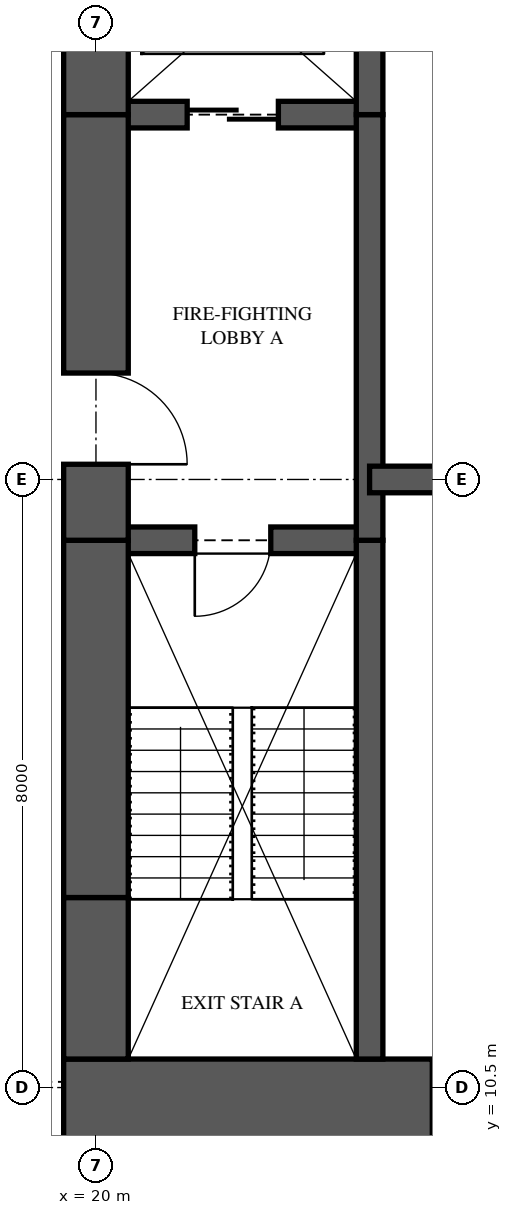
"""IFC4 building model, lengths in metres.
Left out: names, types, materials, properties, quantities, classifications, styles, units other than length and angle.
Written with IfcOpenShell. Run it as: python <this file> out.ifc"""

import sys

from ifc_helpers import new_model, si_unit, direction, frame, frame_2d, origin, place, context, subcontext, project, spatial, rectangle, extrude, element, fill, save


model = new_model("IFC4")
c1 = context("Model", 3, precision=1e-05, world=origin(), true_north=direction((0.0, 1.0)))
c2 = subcontext(c1, "Body", "Model", "MODEL_VIEW")
j1 = project(units=[si_unit("LENGTHUNIT", "METRE"), si_unit("PLANEANGLEUNIT", "RADIAN")], contexts=[c1])
p1 = place(None, origin())
s1 = spatial("IfcSite", under=j1, at=p1, CompositionType="ELEMENT")
p2 = place(p1, origin())
s2 = spatial("IfcBuilding", under=s1, at=p2, CompositionType="ELEMENT")
p3 = place(p2, frame((0.0, 0.0, 111.55)))
s3 = spatial("IfcBuildingStorey", under=s2, at=p3, CompositionType="ELEMENT", Elevation=111.55)
p4 = place(p3, frame((19.575, 10.125, 0.0), z_axis=(0.0, 0.0, 1.0), x_axis=(1.0, 0.0, 0.0)))
e1 = element("IfcWall", 1, at=p4, inside=s3, PredefinedType="SHEAR", context=c2, shape_type="SweptSolid", body=[
    extrude(rectangle(XDim=6.425, YDim=1.5, at=frame_2d((3.212, 0.0))), origin(), (0.0, 0.0, 1.0), 3.35),
])
p5 = place(p4, frame((4.85, 0.0, 0.0)))
e2 = element("IfcOpeningElement", 2, at=p5, cuts=e1, PredefinedType="OPENING", context=c2, shape_type="SweptSolid", body=[
    extrude(rectangle(XDim=0.75, YDim=2.1, at=frame_2d((0.375, 1.05))), frame((0.0, 0.76, 0.0), z_axis=(0.0, -1.0, 0.0), x_axis=(1.0, 0.0, 0.0)), (0.0, 0.0, 1.0), 1.52),
])
p6 = place(p3, frame((20.0, 26.125, 0.0), z_axis=(0.0, 0.0, 1.0), x_axis=(0.0, -1.0, 0.0)))
e3 = element("IfcWall", 3, at=p6, inside=s3, PredefinedType="SHEAR", context=c2, shape_type="SweptSolid", body=[
    extrude(rectangle(XDim=2.825, YDim=0.85, at=frame_2d((1.413, 0.0))), origin(), (0.0, 0.0, 1.0), 3.35),
])
p7 = place(p3, frame((20.0, 23.3, 0.0), z_axis=(0.0, 0.0, 1.0), x_axis=(0.0, -1.0, 0.0)))
e4 = element("IfcWall", 4, at=p7, inside=s3, PredefinedType="SHEAR", context=c2, shape_type="SweptSolid", body=[
    extrude(rectangle(XDim=5.6, YDim=0.85, at=frame_2d((2.8, 0.0))), origin(), (0.0, 0.0, 1.0), 3.35),
])
p8 = place(p7, frame((3.4, 0.0, 0.0)))
e5 = element("IfcOpeningElement", 5, at=p8, cuts=e4, PredefinedType="OPENING", context=c2, shape_type="SweptSolid", body=[
    extrude(rectangle(XDim=1.2, YDim=2.2, at=frame_2d((0.6, 1.1))), frame((0.0, 0.435, 0.0), z_axis=(0.0, -1.0, 0.0), x_axis=(1.0, 0.0, 0.0)), (0.0, 0.0, 1.0), 0.87),
])
p9 = place(p3, frame((20.0, 17.7, 0.0), z_axis=(0.0, 0.0, 1.0), x_axis=(0.0, -1.0, 0.0)))
e6 = element("IfcWall", 6, at=p9, inside=s3, PredefinedType="SHEAR", context=c2, shape_type="SweptSolid", body=[
    extrude(rectangle(XDim=4.7, YDim=0.85, at=frame_2d((2.35, 0.0))), origin(), (0.0, 0.0, 1.0), 3.35),
])
p10 = place(p3, frame((20.0, 13.0, 0.0), z_axis=(0.0, 0.0, 1.0), x_axis=(0.0, -1.0, 0.0)))
e7 = element("IfcWall", 7, at=p10, inside=s3, PredefinedType="SHEAR", context=c2, shape_type="SweptSolid", body=[
    extrude(rectangle(XDim=2.125, YDim=0.85, at=frame_2d((1.062, 0.0))), origin(), (0.0, 0.0, 1.0), 3.35),
])
p11 = place(p3, frame((23.6, 10.875, 0.0), z_axis=(0.0, 0.0, 1.0), x_axis=(0.0, 1.0, 0.0)))
e8 = element("IfcWall", 8, at=p11, inside=s3, PredefinedType="SHEAR", context=c2, shape_type="SweptSolid", body=[
    extrude(rectangle(XDim=6.825, YDim=0.35, at=frame_2d((3.413, 0.0))), origin(), (0.0, 0.0, 1.0), 3.35),
])
p12 = place(p3, frame((23.6, 17.7, 0.0), z_axis=(0.0, 0.0, 1.0), x_axis=(0.0, 1.0, 0.0)))
e9 = element("IfcWall", 9, at=p12, inside=s3, PredefinedType="SHEAR", context=c2, shape_type="SweptSolid", body=[
    extrude(rectangle(XDim=5.6, YDim=0.35, at=frame_2d((2.8, 0.0))), origin(), (0.0, 0.0, 1.0), 3.35),
])
p13 = place(p3, frame((23.6, 23.3, 0.0), z_axis=(0.0, 0.0, 1.0), x_axis=(0.0, 1.0, 0.0)))
e10 = element("IfcWall", 10, at=p13, inside=s3, PredefinedType="SHEAR", context=c2, shape_type="SweptSolid", body=[
    extrude(rectangle(XDim=2.825, YDim=0.35, at=frame_2d((1.413, 0.0))), origin(), (0.0, 0.0, 1.0), 3.35),
])
p14 = place(p3, frame((20.0, 17.7, 0.0), z_axis=(0.0, 0.0, 1.0), x_axis=(1.0, 0.0, 0.0)))
e11 = element("IfcWall", 11, at=p14, inside=s3, PredefinedType="SHEAR", context=c2, shape_type="SweptSolid", body=[
    extrude(rectangle(XDim=3.6, YDim=0.35, at=frame_2d((1.8, 0.0))), origin(), (0.0, 0.0, 1.0), 3.35),
])
p15 = place(p14, frame((1.3, 0.0, 0.0)))
e12 = element("IfcOpeningElement", 12, at=p15, cuts=e11, PredefinedType="OPENING", context=c2, shape_type="SweptSolid", body=[
    extrude(rectangle(XDim=1.0, YDim=2.1, at=frame_2d((0.5, 1.05))), frame((0.0, 0.185, 0.0), z_axis=(0.0, -1.0, 0.0), x_axis=(1.0, 0.0, 0.0)), (0.0, 0.0, 1.0), 0.37),
])
p16 = place(p3, frame((20.0, 23.3, 0.0), z_axis=(0.0, 0.0, 1.0), x_axis=(1.0, 0.0, 0.0)))
e13 = element("IfcWall", 13, at=p16, inside=s3, PredefinedType="SHEAR", context=c2, shape_type="SweptSolid", body=[
    extrude(rectangle(XDim=3.6, YDim=0.35, at=frame_2d((1.8, 0.0))), origin(), (0.0, 0.0, 1.0), 3.35),
])
p17 = place(p16, frame((1.2, 0.0, 0.0)))
e14 = element("IfcOpeningElement", 14, at=p17, cuts=e13, PredefinedType="OPENING", context=c2, shape_type="SweptSolid", body=[
    extrude(rectangle(XDim=1.2, YDim=2.1, at=frame_2d((0.6, 1.05))), frame((0.0, 0.185, 0.0), z_axis=(0.0, -1.0, 0.0), x_axis=(1.0, 0.0, 0.0)), (0.0, 0.0, 1.0), 0.37),
])
p18 = place(p3, frame((23.6, 18.5, 0.0), z_axis=(0.0, 0.0, 1.0), x_axis=(1.0, 0.0, 0.0)))
e15 = element("IfcWall", 15, at=p18, inside=s3, PredefinedType="SHEAR", context=c2, shape_type="SweptSolid", body=[
    extrude(rectangle(XDim=2.4, YDim=0.35, at=frame_2d((1.2, 0.0))), origin(), (0.0, 0.0, 1.0), 3.35),
])
p19 = place(p15, frame((1.0, 0.0, 0.0), z_axis=(0.0, 0.0, 1.0), x_axis=(-1.0, 0.0, 0.0)))
e16 = element("IfcDoor", 16, at=p19, inside=s3, OperationType="SINGLE_SWING_RIGHT", PredefinedType="DOOR", context=c2, shape_type="SweptSolid", body=[
    extrude(rectangle(XDim=1.0, YDim=2.1, at=frame_2d((0.5, 1.05))), frame((0.0, 0.025, 0.0), z_axis=(0.0, -1.0, 0.0), x_axis=(1.0, 0.0, 0.0)), (0.0, 0.0, 1.0), 0.05),
])
fill(e12, e16)
p20 = place(p8, origin())
e17 = element("IfcDoor", 17, at=p20, inside=s3, OperationType="SINGLE_SWING_RIGHT", PredefinedType="DOOR", context=c2, shape_type="SweptSolid", body=[
    extrude(rectangle(XDim=1.2, YDim=2.2, at=frame_2d((0.6, 1.1))), frame((0.0, 0.025, 0.0), z_axis=(0.0, -1.0, 0.0), x_axis=(1.0, 0.0, 0.0)), (0.0, 0.0, 1.0), 0.05),
])
fill(e5, e17)
p21 = place(p17, origin())
e18 = element("IfcDoor", 18, at=p21, inside=s3, OperationType="SLIDING_TO_LEFT", PredefinedType="DOOR", context=c2, shape_type="SweptSolid", body=[
    extrude(rectangle(XDim=1.2, YDim=2.1, at=frame_2d((0.6, 1.05))), frame((0.0, 0.025, 0.0), z_axis=(0.0, -1.0, 0.0), x_axis=(1.0, 0.0, 0.0)), (0.0, 0.0, 1.0), 0.05),
])
fill(e14, e18)
save(model, sys.argv[1])
